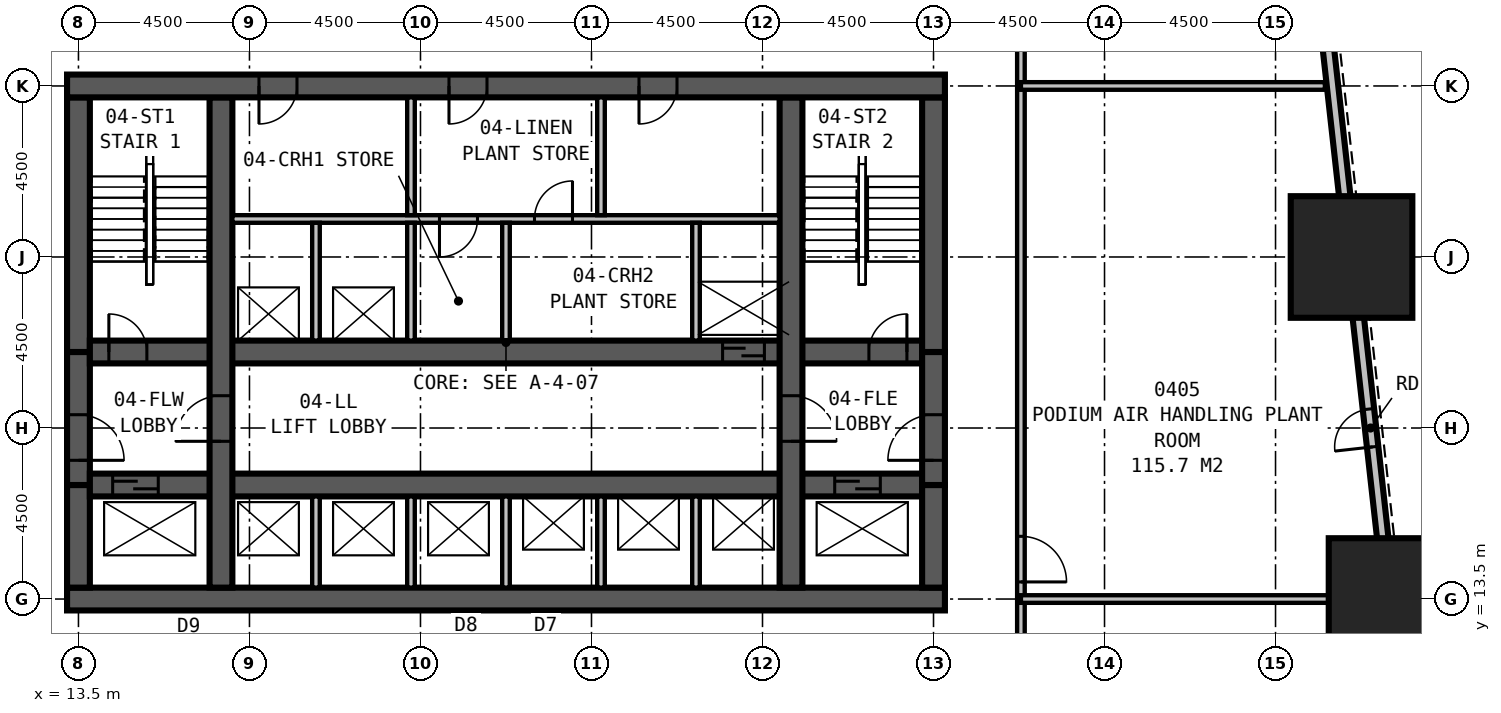
"""IFC4 building model, lengths in metres.
Left out: names, types, materials, properties, quantities, classifications, styles, units other than length and angle.
Written with IfcOpenShell. Run it as: python <this file> out.ifc"""

import sys

from ifc_helpers import new_model, si_unit, direction, frame, frame_2d, origin, origin_2d, place, context, subcontext, project, spatial, rectangle, extrude, element, fill, save


model = new_model("IFC4")
c1 = context("Model", 3, precision=1e-05, world=origin(), true_north=direction((0.0, 1.0)))
c2 = subcontext(c1, "Body", "Model", "MODEL_VIEW")
j1 = project(units=[si_unit("LENGTHUNIT", "METRE"), si_unit("PLANEANGLEUNIT", "RADIAN")], contexts=[c1])
p1 = place(None, origin())
s1 = spatial("IfcSite", under=j1, at=p1, CompositionType="ELEMENT")
p2 = place(p1, origin())
s2 = spatial("IfcBuilding", under=s1, at=p2, CompositionType="ELEMENT")
p3 = place(p2, frame((0.0, 0.0, 24.0)))
s3 = spatial("IfcBuildingStorey", under=s2, at=p3, CompositionType="ELEMENT", Elevation=24.0)
for number, where, z_axis, x_axis in (
    (1, (48.0, 13.5, 0.0), (0.0, 0.0, 1.0), (1.0, 0.0, 0.0)),
    (2, (47.0, 22.5, 0.0), (0.0, 0.0, 1.0), (1.0, 0.0, 0.0)),
):
    element("IfcColumn", number, at=place(p3, frame(where, z_axis=z_axis, x_axis=x_axis)), inside=s3, PredefinedType="COLUMN", context=c2, shape_type="SweptSolid", body=[
        extrude(rectangle(XDim=3.2, YDim=3.2, at=origin_2d()), origin(), (0.0, 0.0, 1.0), 5.7),
    ])
p4 = place(p3, frame((13.2, 13.5, 0.0), z_axis=(0.0, 0.0, 1.0), x_axis=(1.0, 0.0, 0.0)))
e3 = element("IfcWall", 3, at=p4, inside=s3, PredefinedType="SHEAR", context=c2, shape_type="SweptSolid", body=[
    extrude(rectangle(XDim=23.1, YDim=0.6, at=frame_2d((11.55, 0.0))), origin(), (0.0, 0.0, 1.0), 5.7),
])
p5 = place(p3, frame((36.3, 27.0, 0.0), z_axis=(0.0, 0.0, 1.0), x_axis=(-1.0, 0.0, 0.0)))
e4 = element("IfcWall", 4, at=p5, inside=s3, PredefinedType="SHEAR", context=c2, shape_type="SweptSolid", body=[
    extrude(rectangle(XDim=23.1, YDim=0.6, at=frame_2d((11.55, 0.0))), origin(), (0.0, 0.0, 1.0), 5.7),
])
p6 = place(p5, frame((17.05, 0.0, 0.0)))
e5 = element("IfcOpeningElement", 5, at=p6, cuts=e4, PredefinedType="OPENING", context=c2, shape_type="SweptSolid", body=[
    extrude(rectangle(XDim=1.0, YDim=2.1, at=frame_2d((0.5, 1.05))), frame((0.0, 0.31, 0.0), z_axis=(0.0, -1.0, 0.0), x_axis=(1.0, 0.0, 0.0)), (0.0, 0.0, 1.0), 0.62),
])
p7 = place(p5, frame((12.05, 0.0, 0.0)))
e6 = element("IfcOpeningElement", 6, at=p7, cuts=e4, PredefinedType="OPENING", context=c2, shape_type="SweptSolid", body=[
    extrude(rectangle(XDim=1.0, YDim=2.1, at=frame_2d((0.5, 1.05))), frame((0.0, 0.31, 0.0), z_axis=(0.0, -1.0, 0.0), x_axis=(1.0, 0.0, 0.0)), (0.0, 0.0, 1.0), 0.62),
])
p8 = place(p5, frame((7.05, 0.0, 0.0)))
e7 = element("IfcOpeningElement", 7, at=p8, cuts=e4, PredefinedType="OPENING", context=c2, shape_type="SweptSolid", body=[
    extrude(rectangle(XDim=1.0, YDim=2.1, at=frame_2d((0.5, 1.05))), frame((0.0, 0.31, 0.0), z_axis=(0.0, -1.0, 0.0), x_axis=(1.0, 0.0, 0.0)), (0.0, 0.0, 1.0), 0.62),
])
p9 = place(p3, frame((17.25, 13.8, 0.0), z_axis=(0.0, 0.0, 1.0), x_axis=(0.0, 1.0, 0.0)))
e8 = element("IfcWall", 8, at=p9, inside=s3, PredefinedType="SHEAR", context=c2, shape_type="SweptSolid", body=[
    extrude(rectangle(XDim=12.9, YDim=0.6, at=frame_2d((6.45, 0.0))), origin(), (0.0, 0.0, 1.0), 5.7),
])
p10 = place(p9, frame((3.85, 0.0, 0.0)))
e9 = element("IfcOpeningElement", 9, at=p10, cuts=e8, PredefinedType="OPENING", context=c2, shape_type="SweptSolid", body=[
    extrude(rectangle(XDim=1.2, YDim=2.1, at=frame_2d((0.6, 1.05))), frame((0.0, 0.31, 0.0), z_axis=(0.0, -1.0, 0.0), x_axis=(1.0, 0.0, 0.0)), (0.0, 0.0, 1.0), 0.62),
])
p11 = place(p3, frame((32.25, 13.8, 0.0), z_axis=(0.0, 0.0, 1.0), x_axis=(0.0, 1.0, 0.0)))
e10 = element("IfcWall", 10, at=p11, inside=s3, PredefinedType="SHEAR", context=c2, shape_type="SweptSolid", body=[
    extrude(rectangle(XDim=12.9, YDim=0.6, at=frame_2d((6.45, 0.0))), origin(), (0.0, 0.0, 1.0), 5.7),
])
p12 = place(p11, frame((5.05, 0.0, 0.0), z_axis=(0.0, 0.0, 1.0), x_axis=(-1.0, 0.0, 0.0)))
e11 = element("IfcOpeningElement", 11, at=p12, cuts=e10, PredefinedType="OPENING", context=c2, shape_type="SweptSolid", body=[
    extrude(rectangle(XDim=1.2, YDim=2.1, at=frame_2d((0.6, 1.05))), frame((0.0, 0.31, 0.0), z_axis=(0.0, -1.0, 0.0), x_axis=(1.0, 0.0, 0.0)), (0.0, 0.0, 1.0), 0.62),
])
p13 = place(p3, frame((13.8, 16.5, 0.0), z_axis=(0.0, 0.0, 1.0), x_axis=(1.0, 0.0, 0.0)))
e12 = element("IfcWall", 12, at=p13, inside=s3, PredefinedType="SHEAR", context=c2, shape_type="SweptSolid", body=[
    extrude(rectangle(XDim=21.9, YDim=0.6, at=frame_2d((10.95, 0.0))), origin(), (0.0, 0.0, 1.0), 5.7),
])
p14 = place(p13, frame((0.6, 0.0, 0.0)))
e13 = element("IfcOpeningElement", 13, at=p14, cuts=e12, PredefinedType="OPENING", context=c2, shape_type="SweptSolid", body=[
    extrude(rectangle(XDim=1.2, YDim=2.1, at=frame_2d((0.6, 1.05))), frame((0.0, 0.31, 0.0), z_axis=(0.0, -1.0, 0.0), x_axis=(1.0, 0.0, 0.0)), (0.0, 0.0, 1.0), 0.62),
])
p15 = place(p13, frame((19.6, 0.0, 0.0)))
e14 = element("IfcOpeningElement", 14, at=p15, cuts=e12, PredefinedType="OPENING", context=c2, shape_type="SweptSolid", body=[
    extrude(rectangle(XDim=1.2, YDim=2.1, at=frame_2d((0.6, 1.05))), frame((0.0, 0.31, 0.0), z_axis=(0.0, -1.0, 0.0), x_axis=(1.0, 0.0, 0.0)), (0.0, 0.0, 1.0), 0.62),
])
p16 = place(p3, frame((13.8, 20.0, 0.0), z_axis=(0.0, 0.0, 1.0), x_axis=(1.0, 0.0, 0.0)))
e15 = element("IfcWall", 15, at=p16, inside=s3, PredefinedType="SHEAR", context=c2, shape_type="SweptSolid", body=[
    extrude(rectangle(XDim=21.9, YDim=0.6, at=frame_2d((10.95, 0.0))), origin(), (0.0, 0.0, 1.0), 5.7),
])
p17 = place(p16, frame((0.5, 0.0, 0.0)))
e16 = element("IfcOpeningElement", 16, at=p17, cuts=e15, PredefinedType="OPENING", context=c2, shape_type="SweptSolid", body=[
    extrude(rectangle(XDim=1.0, YDim=2.1, at=frame_2d((0.5, 1.05))), frame((0.0, 0.31, 0.0), z_axis=(0.0, -1.0, 0.0), x_axis=(1.0, 0.0, 0.0)), (0.0, 0.0, 1.0), 0.62),
])
p18 = place(p16, frame((20.5, 0.0, 0.0)))
e17 = element("IfcOpeningElement", 17, at=p18, cuts=e15, PredefinedType="OPENING", context=c2, shape_type="SweptSolid", body=[
    extrude(rectangle(XDim=1.0, YDim=2.1, at=frame_2d((0.5, 1.05))), frame((0.0, 0.31, 0.0), z_axis=(0.0, -1.0, 0.0), x_axis=(1.0, 0.0, 0.0)), (0.0, 0.0, 1.0), 0.62),
])
p19 = place(p16, frame((16.65, 0.0, 0.0)))
e18 = element("IfcOpeningElement", 18, at=p19, cuts=e15, PredefinedType="OPENING", context=c2, shape_type="SweptSolid", body=[
    extrude(rectangle(XDim=1.1, YDim=2.1, at=frame_2d((0.55, 1.05))), frame((0.0, 0.31, 0.0), z_axis=(0.0, -1.0, 0.0), x_axis=(1.0, 0.0, 0.0)), (0.0, 0.0, 1.0), 0.62),
])
p20 = place(p3, frame((13.5, 26.7, 0.0), z_axis=(0.0, 0.0, 1.0), x_axis=(0.0, -1.0, 0.0)))
e19 = element("IfcWall", 19, at=p20, inside=s3, PredefinedType="SHEAR", context=c2, shape_type="SweptSolid", body=[
    extrude(rectangle(XDim=6.7, YDim=0.6, at=frame_2d((3.35, 0.0))), origin(), (0.0, 0.0, 1.0), 5.7),
])
p21 = place(p3, frame((13.5, 20.0, 0.0), z_axis=(0.0, 0.0, 1.0), x_axis=(0.0, -1.0, 0.0)))
e20 = element("IfcWall", 20, at=p21, inside=s3, PredefinedType="SHEAR", context=c2, shape_type="SweptSolid", body=[
    extrude(rectangle(XDim=3.5, YDim=0.6, at=frame_2d((1.75, 0.0))), origin(), (0.0, 0.0, 1.0), 5.7),
])
p22 = place(p21, frame((1.65, 0.0, 0.0)))
e21 = element("IfcOpeningElement", 21, at=p22, cuts=e20, PredefinedType="OPENING", context=c2, shape_type="SweptSolid", body=[
    extrude(rectangle(XDim=1.2, YDim=2.1, at=frame_2d((0.6, 1.05))), frame((0.0, 0.31, 0.0), z_axis=(0.0, -1.0, 0.0), x_axis=(1.0, 0.0, 0.0)), (0.0, 0.0, 1.0), 0.62),
])
for number, where, z_axis, x_axis in (
    (22, (13.5, 16.5, 0.0), (0.0, 0.0, 1.0), (0.0, -1.0, 0.0)),
    (23, (36.0, 13.8, 0.0), (0.0, 0.0, 1.0), (0.0, 1.0, 0.0)),
):
    element("IfcWall", number, at=place(p3, frame(where, z_axis=z_axis, x_axis=x_axis)), inside=s3, PredefinedType="SHEAR", context=c2, shape_type="SweptSolid", body=[
        extrude(rectangle(XDim=2.7, YDim=0.6, at=frame_2d((1.35, 0.0))), origin(), (0.0, 0.0, 1.0), 5.7),
    ])
p23 = place(p3, frame((36.0, 16.5, 0.0), z_axis=(0.0, 0.0, 1.0), x_axis=(0.0, 1.0, 0.0)))
e24 = element("IfcWall", 24, at=p23, inside=s3, PredefinedType="SHEAR", context=c2, shape_type="SweptSolid", body=[
    extrude(rectangle(XDim=3.5, YDim=0.6, at=frame_2d((1.75, 0.0))), origin(), (0.0, 0.0, 1.0), 5.7),
])
p24 = place(p23, frame((0.65, 0.0, 0.0)))
e25 = element("IfcOpeningElement", 25, at=p24, cuts=e24, PredefinedType="OPENING", context=c2, shape_type="SweptSolid", body=[
    extrude(rectangle(XDim=1.2, YDim=2.1, at=frame_2d((0.6, 1.05))), frame((0.0, 0.31, 0.0), z_axis=(0.0, -1.0, 0.0), x_axis=(1.0, 0.0, 0.0)), (0.0, 0.0, 1.0), 0.62),
])
p25 = place(p3, frame((36.0, 20.0, 0.0), z_axis=(0.0, 0.0, 1.0), x_axis=(0.0, 1.0, 0.0)))
e26 = element("IfcWall", 26, at=p25, inside=s3, PredefinedType="SHEAR", context=c2, shape_type="SweptSolid", body=[
    extrude(rectangle(XDim=6.7, YDim=0.6, at=frame_2d((3.35, 0.0))), origin(), (0.0, 0.0, 1.0), 5.7),
])
p26 = place(p3, frame((49.017, 4.351, 0.0), z_axis=(0.0, 0.0, 1.0), x_axis=(-0.110433201132, 0.993883548555, 0.0)))
e27 = element("IfcWall", 27, at=p26, inside=s3, PredefinedType="STANDARD", context=c2, shape_type="SweptSolid", body=[
    extrude(rectangle(XDim=31.994, YDim=0.3, at=frame_2d((15.997, 0.0))), origin(), (0.0, 0.0, 1.0), 2.85),
])
p27 = place(p26, frame((3.478, 0.0, 0.5)))
e28 = element("IfcOpeningElement", 28, at=p27, cuts=e27, PredefinedType="OPENING", context=c2, shape_type="SweptSolid", body=[
    extrude(rectangle(XDim=2.4, YDim=2.0, at=frame_2d((1.2, 1.0))), frame((0.0, 0.16, 0.0), z_axis=(0.0, -1.0, 0.0), x_axis=(1.0, 0.0, 0.0)), (0.0, 0.0, 1.0), 0.32),
])
p28 = place(p26, frame((13.233, 0.0, 0.0)))
e29 = element("IfcOpeningElement", 29, at=p28, cuts=e27, PredefinedType="OPENING", context=c2, shape_type="SweptSolid", body=[
    extrude(rectangle(XDim=1.0, YDim=2.1, at=frame_2d((0.5, 1.05))), frame((0.0, 0.16, 0.0), z_axis=(0.0, -1.0, 0.0), x_axis=(1.0, 0.0, 0.0)), (0.0, 0.0, 1.0), 0.32),
])
p29 = place(p3, frame((38.3, 11.2, 0.0), z_axis=(0.0, 0.0, 1.0), x_axis=(0.0, 1.0, 0.0)))
e30 = element("IfcWall", 30, at=p29, inside=s3, PredefinedType="PARTITIONING", context=c2, shape_type="SweptSolid", body=[
    extrude(rectangle(XDim=18.1, YDim=0.2, at=frame_2d((9.05, 0.0))), origin(), (0.0, 0.0, 1.0), 5.45),
])
p30 = place(p29, frame((3.95, 0.0, 0.0), z_axis=(0.0, 0.0, 1.0), x_axis=(-1.0, 0.0, 0.0)))
e31 = element("IfcOpeningElement", 31, at=p30, cuts=e30, PredefinedType="OPENING", context=c2, shape_type="SweptSolid", body=[
    extrude(rectangle(XDim=1.2, YDim=2.1, at=frame_2d((0.6, 1.05))), frame((0.0, 0.11, 0.0), z_axis=(0.0, -1.0, 0.0), x_axis=(1.0, 0.0, 0.0)), (0.0, 0.0, 1.0), 0.22),
])
p31 = place(p3, frame((38.3, 13.5, 0.0), z_axis=(0.0, 0.0, 1.0), x_axis=(1.0, 0.0, 0.0)))
e32 = element("IfcWall", 32, at=p31, inside=s3, PredefinedType="PARTITIONING", context=c2, shape_type="SweptSolid", body=[
    extrude(rectangle(XDim=8.099, YDim=0.2, at=frame_2d((4.05, 0.0))), origin(), (0.0, 0.0, 1.0), 4.15),
])
p32 = place(p3, frame((38.3, 27.0, 0.0), z_axis=(0.0, 0.0, 1.0), x_axis=(1.0, 0.0, 0.0)))
e33 = element("IfcWall", 33, at=p32, inside=s3, PredefinedType="PARTITIONING", context=c2, shape_type="SweptSolid", body=[
    extrude(rectangle(XDim=7.999, YDim=0.2, at=frame_2d((4.0, 0.0))), origin(), (0.0, 0.0, 1.0), 4.15),
])
p33 = place(p3, frame((19.75, 13.8, 0.0), z_axis=(0.0, 0.0, 1.0), x_axis=(0.0, 1.0, 0.0)))
e34 = element("IfcWall", 34, at=p33, inside=s3, PredefinedType="PARTITIONING", context=c2, shape_type="SweptSolid", body=[
    extrude(rectangle(XDim=2.4, YDim=0.2, at=frame_2d((1.2, 0.0))), origin(), (0.0, 0.0, 1.0), 5.45),
])
p34 = place(p3, frame((19.75, 20.3, 0.0), z_axis=(0.0, 0.0, 1.0), x_axis=(0.0, 1.0, 0.0)))
e35 = element("IfcWall", 35, at=p34, inside=s3, PredefinedType="PARTITIONING", context=c2, shape_type="SweptSolid", body=[
    extrude(rectangle(XDim=3.1, YDim=0.2, at=frame_2d((1.55, 0.0))), origin(), (0.0, 0.0, 1.0), 5.45),
])
p35 = place(p3, frame((22.25, 13.8, 0.0), z_axis=(0.0, 0.0, 1.0), x_axis=(0.0, 1.0, 0.0)))
e36 = element("IfcWall", 36, at=p35, inside=s3, PredefinedType="PARTITIONING", context=c2, shape_type="SweptSolid", body=[
    extrude(rectangle(XDim=2.4, YDim=0.2, at=frame_2d((1.2, 0.0))), origin(), (0.0, 0.0, 1.0), 5.45),
])
p36 = place(p3, frame((22.25, 20.3, 0.0), z_axis=(0.0, 0.0, 1.0), x_axis=(0.0, 1.0, 0.0)))
e37 = element("IfcWall", 37, at=p36, inside=s3, PredefinedType="PARTITIONING", context=c2, shape_type="SweptSolid", body=[
    extrude(rectangle(XDim=3.1, YDim=0.2, at=frame_2d((1.55, 0.0))), origin(), (0.0, 0.0, 1.0), 5.45),
])
p37 = place(p3, frame((24.75, 13.8, 0.0), z_axis=(0.0, 0.0, 1.0), x_axis=(0.0, 1.0, 0.0)))
e38 = element("IfcWall", 38, at=p37, inside=s3, PredefinedType="PARTITIONING", context=c2, shape_type="SweptSolid", body=[
    extrude(rectangle(XDim=2.4, YDim=0.2, at=frame_2d((1.2, 0.0))), origin(), (0.0, 0.0, 1.0), 5.45),
])
p38 = place(p3, frame((24.75, 20.3, 0.0), z_axis=(0.0, 0.0, 1.0), x_axis=(0.0, 1.0, 0.0)))
e39 = element("IfcWall", 39, at=p38, inside=s3, PredefinedType="PARTITIONING", context=c2, shape_type="SweptSolid", body=[
    extrude(rectangle(XDim=3.1, YDim=0.2, at=frame_2d((1.55, 0.0))), origin(), (0.0, 0.0, 1.0), 5.45),
])
for number, where, z_axis, x_axis in (
    (40, (27.25, 13.8, 0.0), (0.0, 0.0, 1.0), (0.0, 1.0, 0.0)),
    (41, (29.75, 13.8, 0.0), (0.0, 0.0, 1.0), (0.0, 1.0, 0.0)),
):
    element("IfcWall", number, at=place(p3, frame(where, z_axis=z_axis, x_axis=x_axis)), inside=s3, PredefinedType="PARTITIONING", context=c2, shape_type="SweptSolid", body=[
        extrude(rectangle(XDim=2.4, YDim=0.2, at=frame_2d((1.2, 0.0))), origin(), (0.0, 0.0, 1.0), 5.45),
    ])
p39 = place(p3, frame((29.75, 20.3, 0.0), z_axis=(0.0, 0.0, 1.0), x_axis=(0.0, 1.0, 0.0)))
e42 = element("IfcWall", 42, at=p39, inside=s3, PredefinedType="PARTITIONING", context=c2, shape_type="SweptSolid", body=[
    extrude(rectangle(XDim=3.1, YDim=0.2, at=frame_2d((1.55, 0.0))), origin(), (0.0, 0.0, 1.0), 5.45),
])
p40 = place(p3, frame((17.55, 23.5, 0.0), z_axis=(0.0, 0.0, 1.0), x_axis=(1.0, 0.0, 0.0)))
e43 = element("IfcWall", 43, at=p40, inside=s3, PredefinedType="PARTITIONING", context=c2, shape_type="SweptSolid", body=[
    extrude(rectangle(XDim=14.4, YDim=0.2, at=frame_2d((7.2, 0.0))), origin(), (0.0, 0.0, 1.0), 5.45),
])
p41 = place(p40, frame((6.45, 0.0, 0.0), z_axis=(0.0, 0.0, 1.0), x_axis=(-1.0, 0.0, 0.0)))
e44 = element("IfcOpeningElement", 44, at=p41, cuts=e43, PredefinedType="OPENING", context=c2, shape_type="SweptSolid", body=[
    extrude(rectangle(XDim=1.0, YDim=2.1, at=frame_2d((0.5, 1.05))), frame((0.0, 0.11, 0.0), z_axis=(0.0, -1.0, 0.0), x_axis=(1.0, 0.0, 0.0)), (0.0, 0.0, 1.0), 0.22),
])
p42 = place(p40, frame((7.95, 0.0, 0.0)))
e45 = element("IfcOpeningElement", 45, at=p42, cuts=e43, PredefinedType="OPENING", context=c2, shape_type="SweptSolid", body=[
    extrude(rectangle(XDim=1.0, YDim=2.1, at=frame_2d((0.5, 1.05))), frame((0.0, 0.11, 0.0), z_axis=(0.0, -1.0, 0.0), x_axis=(1.0, 0.0, 0.0)), (0.0, 0.0, 1.0), 0.22),
])
for number, where, z_axis, x_axis in (
    (46, (22.25, 23.6, 0.0), (0.0, 0.0, 1.0), (0.0, 1.0, 0.0)),
    (47, (27.25, 23.6, 0.0), (0.0, 0.0, 1.0), (0.0, 1.0, 0.0)),
):
    element("IfcWall", number, at=place(p3, frame(where, z_axis=z_axis, x_axis=x_axis)), inside=s3, PredefinedType="PARTITIONING", context=c2, shape_type="SweptSolid", body=[
        extrude(rectangle(XDim=3.1, YDim=0.2, at=frame_2d((1.55, 0.0))), origin(), (0.0, 0.0, 1.0), 5.45),
    ])
p43 = place(p28, origin())
e48 = element("IfcDoor", 48, at=p43, inside=s3, OperationType="SINGLE_SWING_LEFT", PredefinedType="DOOR", context=c2, shape_type="SweptSolid", body=[
    extrude(rectangle(XDim=1.0, YDim=2.1, at=frame_2d((0.5, 1.05))), frame((0.0, 0.025, 0.0), z_axis=(0.0, -1.0, 0.0), x_axis=(1.0, 0.0, 0.0)), (0.0, 0.0, 1.0), 0.05),
])
fill(e29, e48)
p44 = place(p30, origin())
e49 = element("IfcDoor", 49, at=p44, inside=s3, OperationType="SINGLE_SWING_RIGHT", PredefinedType="DOOR", context=c2, shape_type="SweptSolid", body=[
    extrude(rectangle(XDim=1.2, YDim=2.1, at=frame_2d((0.6, 1.05))), frame((0.0, 0.025, 0.0), z_axis=(0.0, -1.0, 0.0), x_axis=(1.0, 0.0, 0.0)), (0.0, 0.0, 1.0), 0.05),
])
fill(e31, e49)
p45 = place(p41, origin())
e50 = element("IfcDoor", 50, at=p45, inside=s3, OperationType="SINGLE_SWING_RIGHT", PredefinedType="DOOR", context=c2, shape_type="SweptSolid", body=[
    extrude(rectangle(XDim=1.0, YDim=2.1, at=frame_2d((0.5, 1.05))), frame((0.0, 0.025, 0.0), z_axis=(0.0, -1.0, 0.0), x_axis=(1.0, 0.0, 0.0)), (0.0, 0.0, 1.0), 0.05),
])
fill(e44, e50)
p46 = place(p42, origin())
e51 = element("IfcDoor", 51, at=p46, inside=s3, OperationType="SINGLE_SWING_RIGHT", PredefinedType="DOOR", context=c2, shape_type="SweptSolid", body=[
    extrude(rectangle(XDim=1.0, YDim=2.1, at=frame_2d((0.5, 1.05))), frame((0.0, 0.025, 0.0), z_axis=(0.0, -1.0, 0.0), x_axis=(1.0, 0.0, 0.0)), (0.0, 0.0, 1.0), 0.05),
])
fill(e45, e51)
p47 = place(p22, origin())
e52 = element("IfcDoor", 52, at=p47, inside=s3, OperationType="SINGLE_SWING_RIGHT", PredefinedType="DOOR", context=c2, shape_type="SweptSolid", body=[
    extrude(rectangle(XDim=1.2, YDim=2.1, at=frame_2d((0.6, 1.05))), frame((0.0, 0.3, 0.0), z_axis=(0.0, -1.0, 0.0), x_axis=(1.0, 0.0, 0.0)), (0.0, 0.0, 1.0), 0.6),
])
fill(e21, e52)
p48 = place(p24, origin())
e53 = element("IfcDoor", 53, at=p48, inside=s3, OperationType="SINGLE_SWING_LEFT", PredefinedType="DOOR", context=c2, shape_type="SweptSolid", body=[
    extrude(rectangle(XDim=1.2, YDim=2.1, at=frame_2d((0.6, 1.05))), frame((0.0, 0.3, 0.0), z_axis=(0.0, -1.0, 0.0), x_axis=(1.0, 0.0, 0.0)), (0.0, 0.0, 1.0), 0.6),
])
fill(e25, e53)
p49 = place(p10, origin())
e54 = element("IfcDoor", 54, at=p49, inside=s3, OperationType="SINGLE_SWING_LEFT", PredefinedType="DOOR", context=c2, shape_type="SweptSolid", body=[
    extrude(rectangle(XDim=1.2, YDim=2.1, at=frame_2d((0.6, 1.05))), frame((0.0, 0.3, 0.0), z_axis=(0.0, -1.0, 0.0), x_axis=(1.0, 0.0, 0.0)), (0.0, 0.0, 1.0), 0.6),
])
fill(e9, e54)
p50 = place(p12, origin())
e55 = element("IfcDoor", 55, at=p50, inside=s3, OperationType="SINGLE_SWING_RIGHT", PredefinedType="DOOR", context=c2, shape_type="SweptSolid", body=[
    extrude(rectangle(XDim=1.2, YDim=2.1, at=frame_2d((0.6, 1.05))), frame((0.0, 0.3, 0.0), z_axis=(0.0, -1.0, 0.0), x_axis=(1.0, 0.0, 0.0)), (0.0, 0.0, 1.0), 0.6),
])
fill(e11, e55)
p51 = place(p17, origin())
e56 = element("IfcDoor", 56, at=p51, inside=s3, OperationType="SINGLE_SWING_LEFT", PredefinedType="DOOR", context=c2, shape_type="SweptSolid", body=[
    extrude(rectangle(XDim=1.0, YDim=2.1, at=frame_2d((0.5, 1.05))), frame((0.0, 0.3, 0.0), z_axis=(0.0, -1.0, 0.0), x_axis=(1.0, 0.0, 0.0)), (0.0, 0.0, 1.0), 0.6),
])
fill(e16, e56)
p52 = place(p18, origin())
e57 = element("IfcDoor", 57, at=p52, inside=s3, OperationType="SINGLE_SWING_RIGHT", PredefinedType="DOOR", context=c2, shape_type="SweptSolid", body=[
    extrude(rectangle(XDim=1.0, YDim=2.1, at=frame_2d((0.5, 1.05))), frame((0.0, 0.3, 0.0), z_axis=(0.0, -1.0, 0.0), x_axis=(1.0, 0.0, 0.0)), (0.0, 0.0, 1.0), 0.6),
])
fill(e17, e57)
p53 = place(p19, origin())
e58 = element("IfcDoor", 58, at=p53, inside=s3, OperationType="SLIDING_TO_LEFT", PredefinedType="DOOR", context=c2, shape_type="SweptSolid", body=[
    extrude(rectangle(XDim=1.1, YDim=2.1, at=frame_2d((0.55, 1.05))), frame((0.0, 0.3, 0.0), z_axis=(0.0, -1.0, 0.0), x_axis=(1.0, 0.0, 0.0)), (0.0, 0.0, 1.0), 0.6),
])
fill(e18, e58)
p54 = place(p14, origin())
e59 = element("IfcDoor", 59, at=p54, inside=s3, OperationType="SLIDING_TO_LEFT", PredefinedType="DOOR", context=c2, shape_type="SweptSolid", body=[
    extrude(rectangle(XDim=1.2, YDim=2.1, at=frame_2d((0.6, 1.05))), frame((0.0, 0.3, 0.0), z_axis=(0.0, -1.0, 0.0), x_axis=(1.0, 0.0, 0.0)), (0.0, 0.0, 1.0), 0.6),
])
fill(e13, e59)
p55 = place(p15, origin())
e60 = element("IfcDoor", 60, at=p55, inside=s3, OperationType="SLIDING_TO_LEFT", PredefinedType="DOOR", context=c2, shape_type="SweptSolid", body=[
    extrude(rectangle(XDim=1.2, YDim=2.1, at=frame_2d((0.6, 1.05))), frame((0.0, 0.3, 0.0), z_axis=(0.0, -1.0, 0.0), x_axis=(1.0, 0.0, 0.0)), (0.0, 0.0, 1.0), 0.6),
])
fill(e14, e60)
p56 = place(p6, origin())
e61 = element("IfcDoor", 61, at=p56, inside=s3, OperationType="SINGLE_SWING_RIGHT", PredefinedType="DOOR", context=c2, shape_type="SweptSolid", body=[
    extrude(rectangle(XDim=1.0, YDim=2.1, at=frame_2d((0.5, 1.05))), frame((0.0, 0.3, 0.0), z_axis=(0.0, -1.0, 0.0), x_axis=(1.0, 0.0, 0.0)), (0.0, 0.0, 1.0), 0.6),
])
fill(e5, e61)
p57 = place(p7, origin())
e62 = element("IfcDoor", 62, at=p57, inside=s3, OperationType="SINGLE_SWING_RIGHT", PredefinedType="DOOR", context=c2, shape_type="SweptSolid", body=[
    extrude(rectangle(XDim=1.0, YDim=2.1, at=frame_2d((0.5, 1.05))), frame((0.0, 0.3, 0.0), z_axis=(0.0, -1.0, 0.0), x_axis=(1.0, 0.0, 0.0)), (0.0, 0.0, 1.0), 0.6),
])
fill(e6, e62)
p58 = place(p8, origin())
e63 = element("IfcDoor", 63, at=p58, inside=s3, OperationType="SINGLE_SWING_RIGHT", PredefinedType="DOOR", context=c2, shape_type="SweptSolid", body=[
    extrude(rectangle(XDim=1.0, YDim=2.1, at=frame_2d((0.5, 1.05))), frame((0.0, 0.3, 0.0), z_axis=(0.0, -1.0, 0.0), x_axis=(1.0, 0.0, 0.0)), (0.0, 0.0, 1.0), 0.6),
])
fill(e7, e63)
save(model, sys.argv[1])
